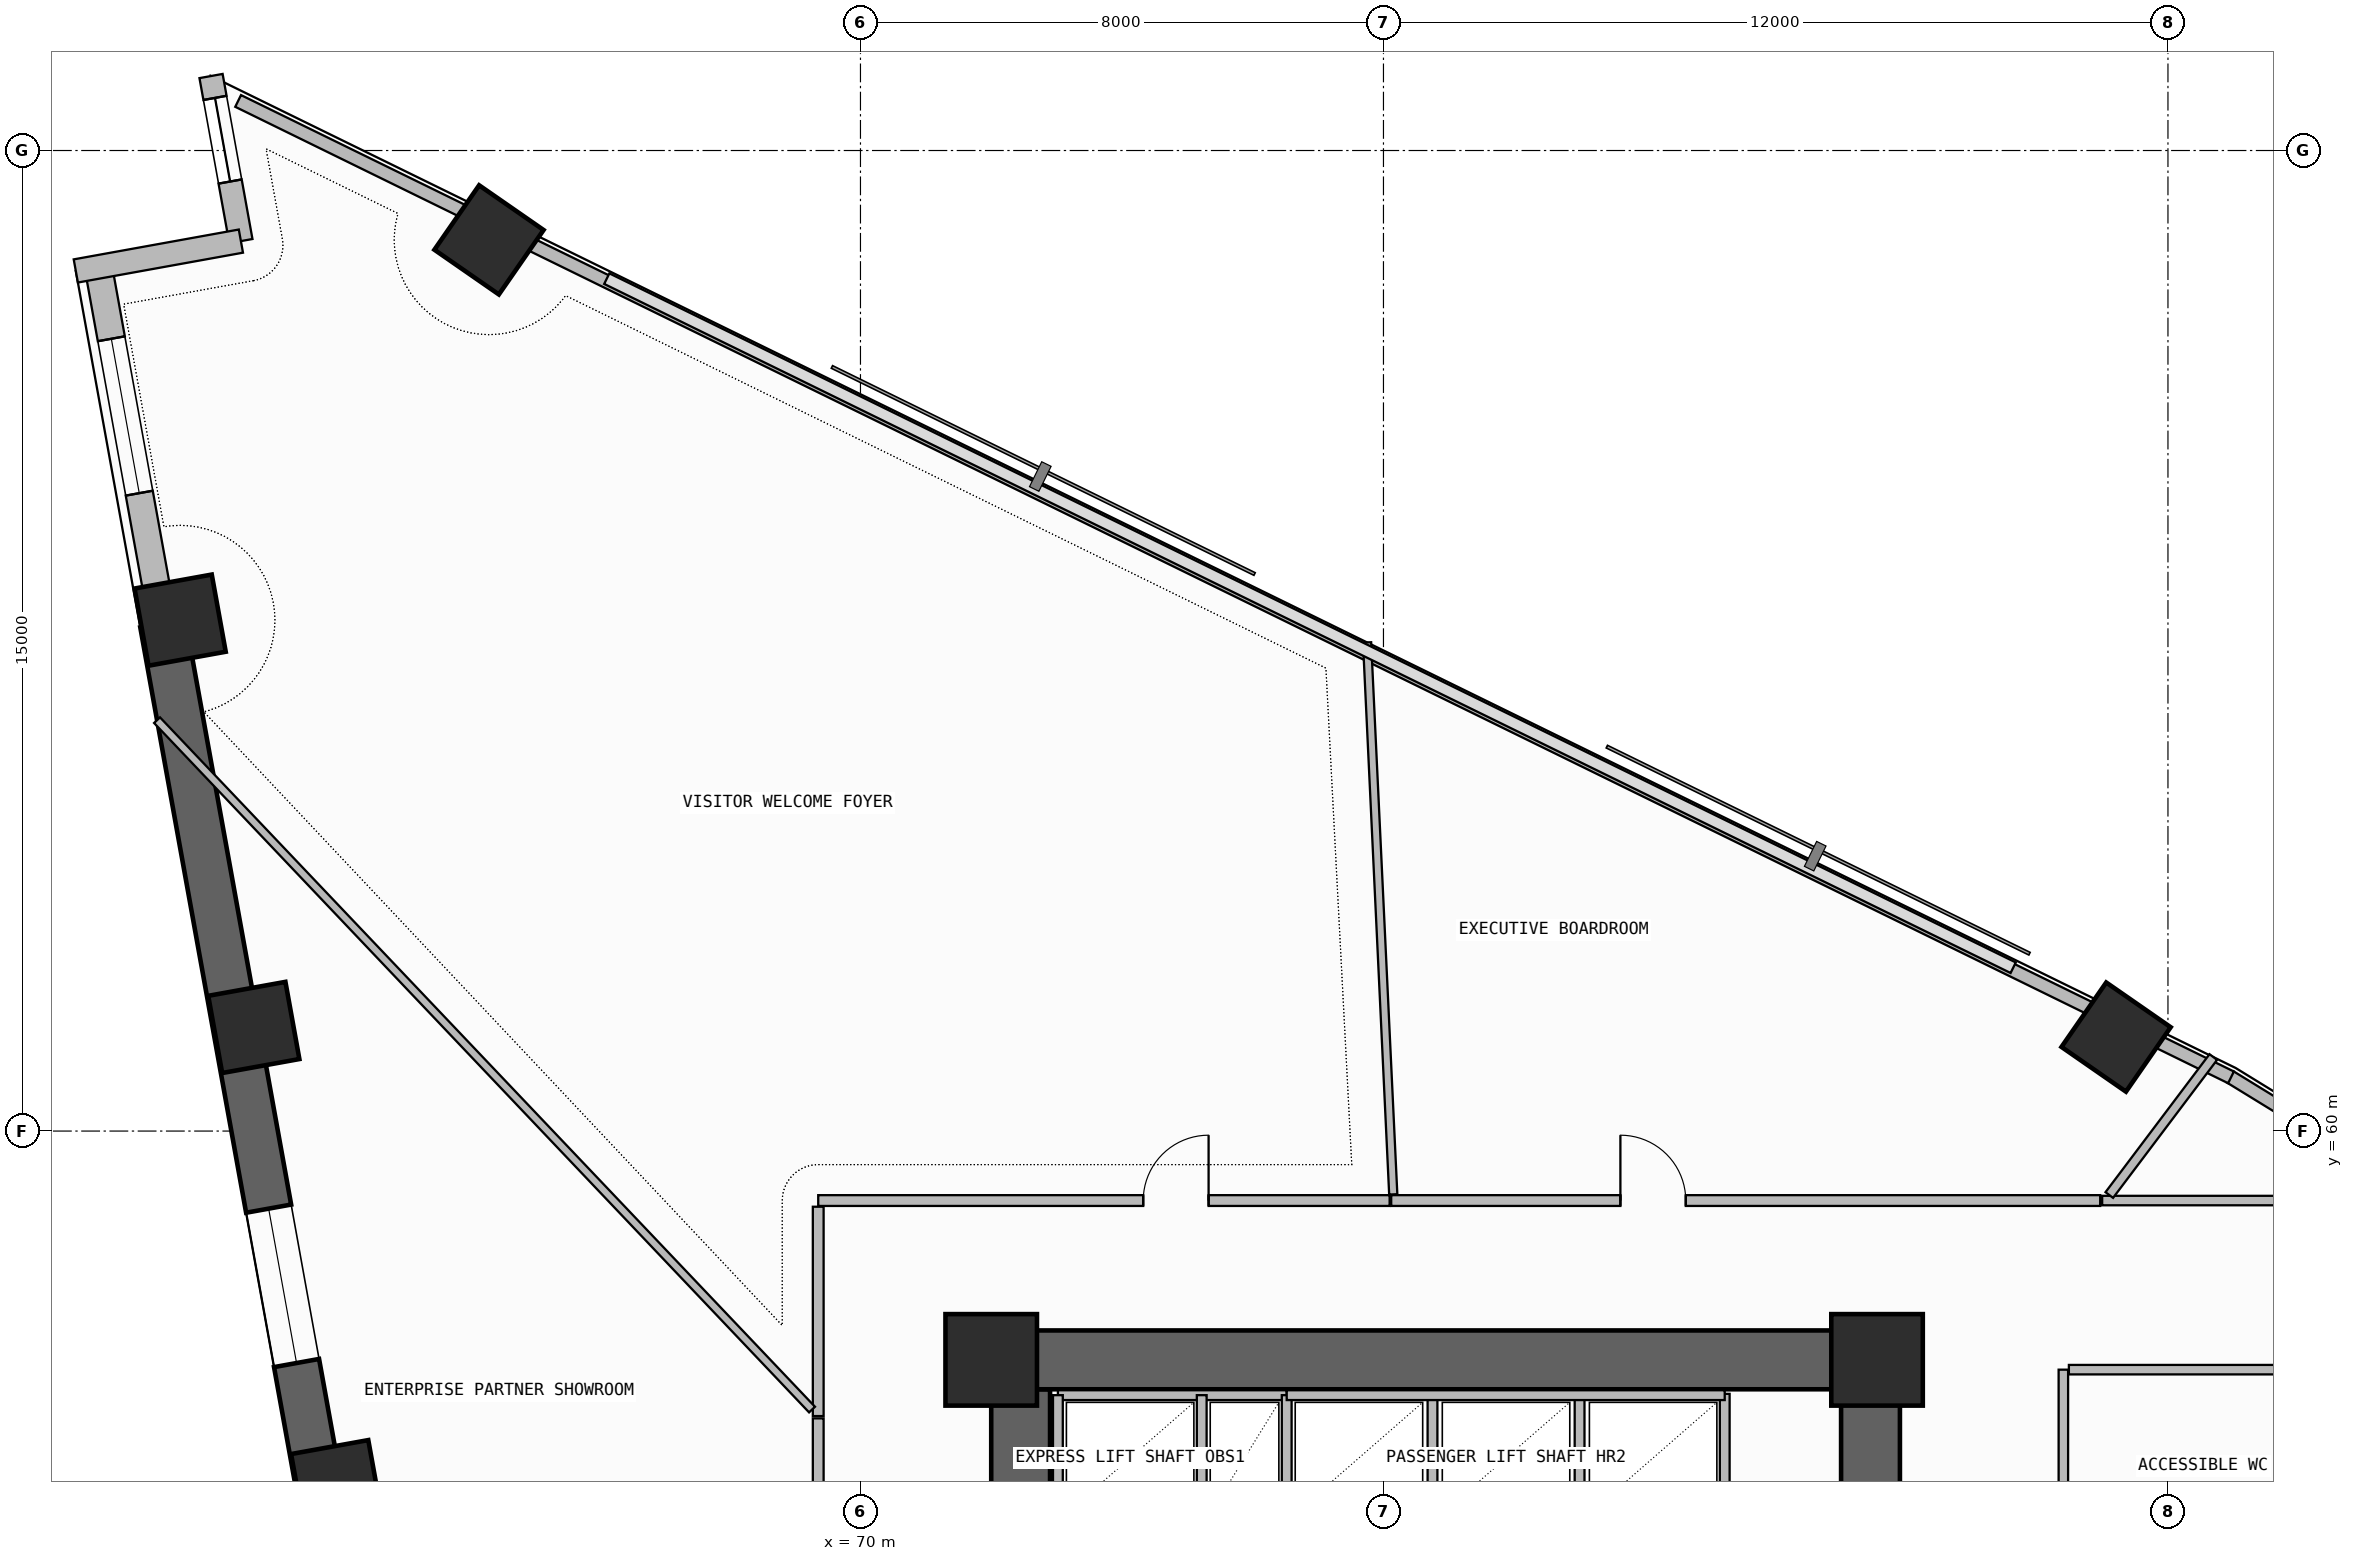
"""IFC4 building model, lengths in metres.
Left out: names, types, materials, properties, quantities, classifications, styles, units other than length and angle.
Written with IfcOpenShell. Run it as: python <this file> out.ifc"""

import sys

from ifc_helpers import new_model, si_unit, direction, frame, frame_2d, origin, origin_2d, place, context, subcontext, project, spatial, rectangle, extrude, element, fill, save


model = new_model("IFC4")
c1 = context("Model", 3, precision=1e-05, world=origin(), true_north=direction((0.0, 1.0)))
c2 = subcontext(c1, "Body", "Model", "MODEL_VIEW")
j1 = project(units=[si_unit("LENGTHUNIT", "METRE"), si_unit("PLANEANGLEUNIT", "RADIAN")], contexts=[c1])
p1 = place(None, origin())
s1 = spatial("IfcSite", under=j1, at=p1, CompositionType="ELEMENT")
p2 = place(p1, origin())
s2 = spatial("IfcBuilding", under=s1, at=p2, CompositionType="ELEMENT")
p3 = place(p2, frame((0.0, 0.0, 106.5)))
s3 = spatial("IfcBuildingStorey", under=s2, at=p3, CompositionType="ELEMENT", Elevation=106.5)
p4 = place(p3, frame((72.45, 43.35, -0.26), z_axis=(0.0, 0.0, 1.0), x_axis=(0.0, 1.0, 0.0)))
e1 = element("IfcWall", 1, at=p4, inside=s3, PredefinedType="SHEAR", context=c2, shape_type="SweptSolid", body=[
    extrude(rectangle(XDim=12.7, YDim=0.9, at=frame_2d((6.35, 0.0))), origin(), (0.0, 0.0, 1.0), 3.6),
])
p5 = place(p4, frame((1.35, 0.0, 0.26)))
e2 = element("IfcOpeningElement", 2, at=p5, cuts=e1, PredefinedType="OPENING", context=c2, shape_type="SweptSolid", body=[
    extrude(rectangle(XDim=1.2, YDim=2.2, at=frame_2d((0.6, 1.1))), frame((0.0, 0.46, 0.0), z_axis=(0.0, -1.0, 0.0), x_axis=(1.0, 0.0, 0.0)), (0.0, 0.0, 1.0), 0.92),
])
p6 = place(p3, frame((72.0, 56.5, -0.26), z_axis=(0.0, 0.0, 1.0), x_axis=(1.0, 0.0, 0.0)))
e3 = element("IfcWall", 3, at=p6, inside=s3, PredefinedType="SHEAR", context=c2, shape_type="SweptSolid", body=[
    extrude(rectangle(XDim=13.9, YDim=0.9, at=frame_2d((6.95, 0.0))), origin(), (0.0, 0.0, 1.0), 3.6),
])
p7 = place(p3, frame((85.45, 47.6, -0.26), z_axis=(0.0, 0.0, 1.0), x_axis=(0.0, 1.0, 0.0)))
e4 = element("IfcWall", 4, at=p7, inside=s3, PredefinedType="SHEAR", context=c2, shape_type="SweptSolid", body=[
    extrude(rectangle(XDim=8.45, YDim=0.9, at=frame_2d((4.225, 0.0))), origin(), (0.0, 0.0, 1.0), 3.6),
])
for number, where, z_axis, x_axis in (
    (5, (72.0, 56.5, 0.0), (0.0, 0.0, 1.0), (1.0, 0.0, 0.0)),
    (6, (85.55, 56.5, 0.0), (0.0, 0.0, 1.0), (1.0, 0.0, 0.0)),
):
    element("IfcColumn", number, at=place(p3, frame(where, z_axis=z_axis, x_axis=x_axis)), inside=s3, PredefinedType="COLUMN", context=c2, shape_type="SweptSolid", body=[
        extrude(rectangle(XDim=1.4, YDim=1.4, at=origin_2d()), origin(), (0.0, 0.0, 1.0), 3.6),
    ])
for number, where, z_axis, x_axis in (
    (7, (89.207, 61.438, 0.0), (0.0, 0.0, 1.0), (0.57, 0.822, 0.0)),
    (8, (64.318, 73.633, 0.0), (0.0, 0.0, 1.0), (0.57, 0.822, 0.0)),
    (9, (59.594, 67.816, 0.0), (0.0, 0.0, 1.0), (-0.178, 0.984, 0.0)),
    (10, (60.72, 61.585, 0.0), (0.0, 0.0, 1.0), (-0.178, 0.984, 0.0)),
    (11, (61.988, 54.575, 0.0), (0.0, 0.0, 1.0), (-0.178, 0.984, 0.0)),
):
    element("IfcColumn", number, at=place(p3, frame(where, z_axis=z_axis, x_axis=x_axis)), inside=s3, PredefinedType="COLUMN", context=c2, shape_type="SweptSolid", body=[
        extrude(rectangle(XDim=1.2, YDim=1.2, at=origin_2d()), origin(), (0.0, 0.0, 1.0), 3.6),
    ])
p8 = place(p3, frame((58.342, 73.22, 0.0), z_axis=(0.0, 0.0, 1.0), x_axis=(0.177981837245, -0.984033772597, 0.0)))
e12 = element("IfcWall", 12, at=p8, inside=s3, PredefinedType="SOLIDWALL", context=c2, shape_type="SweptSolid", body=[
    extrude(rectangle(XDim=5.54, YDim=0.42, at=frame_2d((2.77, 0.0))), origin(), (0.0, 0.0, 1.0), 2.725),
])
p9 = place(p8, frame((1.118, 0.0, 1.2)))
e13 = element("IfcOpeningElement", 13, at=p9, cuts=e12, PredefinedType="OPENING", context=c2, shape_type="SweptSolid", body=[
    extrude(rectangle(XDim=2.4, YDim=0.9, at=frame_2d((1.2, 0.45))), frame((0.0, 0.22, 0.0), z_axis=(0.0, -1.0, 0.0), x_axis=(1.0, 0.0, 0.0)), (0.0, 0.0, 1.0), 0.44),
])
p10 = place(p3, frame((59.328, 67.768, -0.26), z_axis=(0.0, 0.0, 1.0), x_axis=(0.177933213615, -0.984042565895, 0.0)))
e14 = element("IfcWall", 14, at=p10, inside=s3, PredefinedType="SHEAR", context=c2, shape_type="SweptSolid", body=[
    extrude(rectangle(XDim=20.579, YDim=0.7, at=frame_2d((10.289, 0.0))), origin(), (0.0, 0.0, 1.0), 3.6),
])
p11 = place(p10, frame((9.1, 0.0, 1.2)))
e15 = element("IfcOpeningElement", 15, at=p11, cuts=e14, PredefinedType="OPENING", context=c2, shape_type="SweptSolid", body=[
    extrude(rectangle(XDim=2.4, YDim=0.9, at=frame_2d((1.2, 0.45))), frame((0.0, 0.36, 0.0), z_axis=(0.0, -1.0, 0.0), x_axis=(1.0, 0.0, 0.0)), (0.0, 0.0, 1.0), 0.72),
])
p12 = place(p3, frame((60.066, 76.139, 0.0), z_axis=(0.0, 0.0, 1.0), x_axis=(0.177897493713, -0.984049024048, 0.0)))
e16 = element("IfcWall", 16, at=p12, inside=s3, PredefinedType="SOLIDWALL", context=c2, shape_type="SweptSolid", body=[
    extrude(rectangle(XDim=2.566, YDim=0.36, at=frame_2d((1.283, 0.0))), origin(), (0.0, 0.0, 1.0), 3.34),
])
p13 = place(p12, frame((0.34, 0.0, 0.45)))
e17 = element("IfcOpeningElement", 17, at=p13, cuts=e16, PredefinedType="OPENING", context=c2, shape_type="SweptSolid", body=[
    extrude(rectangle(XDim=1.3, YDim=2.4, at=frame_2d((0.65, 1.2))), frame((0.0, 0.19, 0.0), z_axis=(0.0, -1.0, 0.0), x_axis=(1.0, 0.0, 0.0)), (0.0, 0.0, 1.0), 0.38),
])
p14 = place(p3, frame((60.523, 73.614, 0.0), z_axis=(0.0, 0.0, 1.0), x_axis=(-0.984046012923, -0.177914149102, 0.0)))
e18 = element("IfcWall", 18, at=p14, inside=s3, PredefinedType="SOLIDWALL", context=c2, shape_type="SweptSolid", body=[
    extrude(rectangle(XDim=2.566, YDim=0.36, at=frame_2d((1.283, 0.0))), origin(), (0.0, 0.0, 1.0), 3.34),
])
p15 = place(p3, frame((119.865, 43.07, 0.0), z_axis=(0.0, 0.0, 1.0), x_axis=(-0.852110824326, 0.52336138859, 0.0)))
e19 = element("IfcWall", 19, at=p15, inside=s3, PredefinedType="PARAPET", context=c2, shape_type="SweptSolid", body=[
    extrude(rectangle(XDim=33.932, YDim=0.2, at=frame_2d((16.966, 0.0))), origin(), (0.0, 0.0, 1.0), 1.15),
])
p16 = place(p3, frame((90.964, 60.822, 0.0), z_axis=(0.0, 0.0, 1.0), x_axis=(-0.898000468284, 0.439994498787, 0.0)))
e20 = element("IfcWall", 20, at=p16, inside=s3, PredefinedType="PARAPET", context=c2, shape_type="SweptSolid", body=[
    extrude(rectangle(XDim=1.423, YDim=0.2, at=frame_2d((0.712, 0.0))), origin(), (0.0, 0.0, 1.0), 1.15),
])
p17 = place(p3, frame((88.921, 61.823, 0.0), z_axis=(0.0, 0.0, 1.0), x_axis=(-0.897993533426, 0.440008652103, 0.0)))
e21 = element("IfcWall", 21, at=p17, inside=s3, PredefinedType="PARAPET", context=c2, shape_type="SweptSolid", body=[
    extrude(rectangle(XDim=26.864, YDim=0.2, at=frame_2d((13.432, 0.0))), origin(), (0.0, 0.0, 1.0), 1.15),
])
p18 = place(p3, frame((64.032, 74.018, 0.0), z_axis=(0.0, 0.0, 1.0), x_axis=(-0.89799103332, 0.440013754417, 0.0)))
e22 = element("IfcWall", 22, at=p18, inside=s3, PredefinedType="PARAPET", context=c2, shape_type="SweptSolid", body=[
    extrude(rectangle(XDim=3.955, YDim=0.2, at=frame_2d((1.978, 0.0))), origin(), (0.0, 0.0, 1.0), 1.15),
])
p19 = place(p3, frame((73.02, 55.96, 0.0), z_axis=(0.0, 0.0, 1.0), x_axis=(1.0, 0.0, 0.0)))
e23 = element("IfcWall", 23, at=p19, inside=s3, PredefinedType="SOLIDWALL", context=c2, shape_type="SweptSolid", body=[
    extrude(rectangle(XDim=3.5, YDim=0.15, at=frame_2d((1.75, 0.0))), origin(), (0.0, 0.0, 1.0), 3.34),
])
p20 = place(p3, frame((73.02, 54.02, 0.0), z_axis=(0.0, 0.0, 1.0), x_axis=(0.0, 1.0, 0.0)))
e24 = element("IfcWall", 24, at=p20, inside=s3, PredefinedType="PLUMBINGWALL", context=c2, shape_type="SweptSolid", body=[
    extrude(rectangle(XDim=1.94, YDim=0.15, at=frame_2d((0.97, 0.0))), origin(), (0.0, 0.0, 1.0), 3.34),
])
p21 = place(p3, frame((76.52, 54.02, 0.0), z_axis=(0.0, 0.0, 1.0), x_axis=(0.0, 1.0, 0.0)))
e25 = element("IfcWall", 25, at=p21, inside=s3, PredefinedType="SOLIDWALL", context=c2, shape_type="SweptSolid", body=[
    extrude(rectangle(XDim=1.94, YDim=0.15, at=frame_2d((0.97, 0.0))), origin(), (0.0, 0.0, 1.0), 3.34),
])
p22 = place(p3, frame((75.22, 54.02, 0.0), z_axis=(0.0, 0.0, 1.0), x_axis=(0.0, 1.0, 0.0)))
e26 = element("IfcWall", 26, at=p22, inside=s3, PredefinedType="PLUMBINGWALL", context=c2, shape_type="SweptSolid", body=[
    extrude(rectangle(XDim=1.94, YDim=0.15, at=frame_2d((0.97, 0.0))), origin(), (0.0, 0.0, 1.0), 3.34),
])
for number, where, z_axis, x_axis in (
    (27, (78.75, 54.02, 0.0), (0.0, 0.0, 1.0), (0.0, 1.0, 0.0)),
    (28, (81.0, 54.02, 0.0), (0.0, 0.0, 1.0), (0.0, 1.0, 0.0)),
):
    element("IfcWall", number, at=place(p3, frame(where, z_axis=z_axis, x_axis=x_axis)), inside=s3, PredefinedType="PLUMBINGWALL", context=c2, shape_type="SweptSolid", body=[
        extrude(rectangle(XDim=1.96, YDim=0.15, at=frame_2d((0.98, 0.0))), origin(), (0.0, 0.0, 1.0), 3.34),
    ])
p23 = place(p3, frame((83.22, 54.02, 0.0), z_axis=(0.0, 0.0, 1.0), x_axis=(0.0, 1.0, 0.0)))
e29 = element("IfcWall", 29, at=p23, inside=s3, PredefinedType="SOLIDWALL", context=c2, shape_type="SweptSolid", body=[
    extrude(rectangle(XDim=1.96, YDim=0.15, at=frame_2d((0.98, 0.0))), origin(), (0.0, 0.0, 1.0), 3.34),
])
p24 = place(p3, frame((76.52, 55.96, 0.0), z_axis=(0.0, 0.0, 1.0), x_axis=(1.0, 0.0, 0.0)))
e30 = element("IfcWall", 30, at=p24, inside=s3, PredefinedType="SOLIDWALL", context=c2, shape_type="SweptSolid", body=[
    extrude(rectangle(XDim=6.7, YDim=0.15, at=frame_2d((3.35, 0.0))), origin(), (0.0, 0.0, 1.0), 3.34),
])
p25 = place(p3, frame((93.382, 58.937, 0.0), z_axis=(0.0, 0.0, 1.0), x_axis=(-1.0, 0.0, 0.0)))
e31 = element("IfcWall", 31, at=p25, inside=s3, PredefinedType="PARTITIONING", context=c2, shape_type="SweptSolid", body=[
    extrude(rectangle(XDim=4.388, YDim=0.145, at=frame_2d((2.194, 0.0))), origin(), (0.0, 0.0, 1.0), 2.725),
])
p26 = place(p3, frame((89.103, 59.021, 0.0), z_axis=(0.0, 0.0, 1.0), x_axis=(0.601816091095, 0.798634705294, 0.0)))
e32 = element("IfcWall", 32, at=p26, inside=s3, PredefinedType="PARTITIONING", context=c2, shape_type="SweptSolid", body=[
    extrude(rectangle(XDim=2.643, YDim=0.145, at=frame_2d((1.322, 0.0))), origin(), (0.0, 0.0, 1.0), 2.725),
])
p27 = place(p3, frame((88.4, 49.092, 0.0), z_axis=(0.0, 0.0, 1.0), x_axis=(0.0, 1.0, 0.0)))
e33 = element("IfcWall", 33, at=p27, inside=s3, PredefinedType="PARTITIONING", context=c2, shape_type="SweptSolid", body=[
    extrude(rectangle(XDim=7.258, YDim=0.145, at=frame_2d((3.629, 0.0))), origin(), (0.0, 0.0, 1.0), 2.725),
])
p28 = place(p27, frame((3.154, 0.0, 0.0)))
e34 = element("IfcOpeningElement", 34, at=p28, cuts=e33, PredefinedType="OPENING", context=c2, shape_type="SweptSolid", body=[
    extrude(rectangle(XDim=0.95, YDim=2.15, at=frame_2d((0.475, 1.075))), frame((0.0, 0.083, 0.0), z_axis=(0.0, -1.0, 0.0), x_axis=(1.0, 0.0, 0.0)), (0.0, 0.0, 1.0), 0.165),
])
p29 = place(p3, frame((88.485, 56.35, 0.0), z_axis=(0.0, 0.0, 1.0), x_axis=(1.0, 0.0, 0.0)))
e35 = element("IfcWall", 35, at=p29, inside=s3, PredefinedType="PARTITIONING", context=c2, shape_type="SweptSolid", body=[
    extrude(rectangle(XDim=3.427, YDim=0.145, at=frame_2d((1.714, 0.0))), origin(), (0.0, 0.0, 1.0), 2.875),
])
p30 = place(p3, frame((88.963, 58.937, 0.0), z_axis=(0.0, 0.0, 1.0), x_axis=(-1.0, 0.0, 0.0)))
e36 = element("IfcWall", 36, at=p30, inside=s3, PredefinedType="PARTITIONING", context=c2, shape_type="SweptSolid", body=[
    extrude(rectangle(XDim=10.845, YDim=0.165, at=frame_2d((5.422, 0.0))), origin(), (0.0, 0.0, 1.0), 2.725),
])
p31 = place(p30, frame((6.339, 0.0, 0.0)))
e37 = element("IfcOpeningElement", 37, at=p31, cuts=e36, PredefinedType="OPENING", context=c2, shape_type="SweptSolid", body=[
    extrude(rectangle(XDim=1.0, YDim=2.2, at=frame_2d((0.5, 1.1))), frame((0.0, 0.093, 0.0), z_axis=(0.0, -1.0, 0.0), x_axis=(1.0, 0.0, 0.0)), (0.0, 0.0, 1.0), 0.185),
])
p32 = place(p3, frame((78.15, 59.031, 0.0), z_axis=(0.0, 0.0, 1.0), x_axis=(-0.047396361904, 0.998876160932, 0.0)))
e38 = element("IfcWall", 38, at=p32, inside=s3, PredefinedType="PARTITIONING", context=c2, shape_type="SweptSolid", body=[
    extrude(rectangle(XDim=8.453, YDim=0.125, at=frame_2d((4.227, 0.0))), origin(), (0.0, 0.0, 1.0), 3.34),
])
p33 = place(p3, frame((78.094, 58.937, 0.0), z_axis=(0.0, 0.0, 1.0), x_axis=(-1.0, 0.0, 0.0)))
e39 = element("IfcWall", 39, at=p33, inside=s3, PredefinedType="PARTITIONING", context=c2, shape_type="SweptSolid", body=[
    extrude(rectangle(XDim=8.74, YDim=0.165, at=frame_2d((4.37, 0.0))), origin(), (0.0, 0.0, 1.0), 2.725),
])
p34 = place(p33, frame((2.769, 0.0, 0.0)))
e40 = element("IfcOpeningElement", 40, at=p34, cuts=e39, PredefinedType="OPENING", context=c2, shape_type="SweptSolid", body=[
    extrude(rectangle(XDim=1.0, YDim=2.2, at=frame_2d((0.5, 1.1))), frame((0.0, 0.093, 0.0), z_axis=(0.0, -1.0, 0.0), x_axis=(1.0, 0.0, 0.0)), (0.0, 0.0, 1.0), 0.185),
])
p35 = place(p3, frame((69.354, 58.843, 0.0), z_axis=(0.0, 0.0, 1.0), x_axis=(0.0, -1.0, 0.0)))
e41 = element("IfcWall", 41, at=p35, inside=s3, PredefinedType="PARTITIONING", context=c2, shape_type="SweptSolid", body=[
    extrude(rectangle(XDim=3.203, YDim=0.165, at=frame_2d((1.601, 0.0))), origin(), (0.0, 0.0, 1.0), 2.725),
])
p36 = place(p3, frame((69.259, 55.74, 0.0), z_axis=(0.0, 0.0, 1.0), x_axis=(-0.688765781804, 0.72498392935, 0.0)))
e42 = element("IfcWall", 42, at=p36, inside=s3, PredefinedType="PARTITIONING", context=c2, shape_type="SweptSolid", body=[
    extrude(rectangle(XDim=14.547, YDim=0.125, at=frame_2d((7.273, 0.0))), origin(), (0.0, 0.0, 1.0), 2.725),
])
p37 = place(p3, frame((69.354, 55.605, 0.0), z_axis=(0.0, 0.0, 1.0), x_axis=(0.0, -1.0, 0.0)))
e43 = element("IfcWall", 43, at=p37, inside=s3, PredefinedType="PARTITIONING", context=c2, shape_type="SweptSolid", body=[
    extrude(rectangle(XDim=5.513, YDim=0.165, at=frame_2d((2.756, 0.0))), origin(), (0.0, 0.0, 1.0), 2.725),
])
p38 = place(p37, frame((1.639, 0.0, 0.0)))
e44 = element("IfcOpeningElement", 44, at=p38, cuts=e43, PredefinedType="OPENING", context=c2, shape_type="SweptSolid", body=[
    extrude(rectangle(XDim=1.0, YDim=2.2, at=frame_2d((0.5, 1.1))), frame((0.0, 0.093, 0.0), z_axis=(0.0, -1.0, 0.0), x_axis=(1.0, 0.0, 0.0)), (0.0, 0.0, 1.0), 0.185),
])
p39 = place(p9, origin())
e45 = element("IfcWindow", 45, at=p39, inside=s3, PartitioningType="SINGLE_PANEL", PredefinedType="WINDOW", context=c2, shape_type="SweptSolid", body=[
    extrude(rectangle(XDim=2.4, YDim=0.9, at=frame_2d((1.2, 0.45))), frame((0.0, 0.03, 0.0), z_axis=(0.0, -1.0, 0.0), x_axis=(1.0, 0.0, 0.0)), (0.0, 0.0, 1.0), 0.06),
])
fill(e13, e45)
p40 = place(p11, origin())
e46 = element("IfcWindow", 46, at=p40, inside=s3, PartitioningType="SINGLE_PANEL", PredefinedType="WINDOW", context=c2, shape_type="SweptSolid", body=[
    extrude(rectangle(XDim=2.4, YDim=0.9, at=frame_2d((1.2, 0.45))), frame((0.0, 0.03, 0.0), z_axis=(0.0, -1.0, 0.0), x_axis=(1.0, 0.0, 0.0)), (0.0, 0.0, 1.0), 0.06),
])
fill(e15, e46)
p41 = place(p13, origin())
e47 = element("IfcWindow", 47, at=p41, inside=s3, PartitioningType="SINGLE_PANEL", PredefinedType="WINDOW", context=c2, shape_type="SweptSolid", body=[
    extrude(rectangle(XDim=1.3, YDim=2.4, at=frame_2d((0.65, 1.2))), frame((0.0, 0.03, 0.0), z_axis=(0.0, -1.0, 0.0), x_axis=(1.0, 0.0, 0.0)), (0.0, 0.0, 1.0), 0.06),
])
fill(e17, e47)
p42 = place(p31, frame((1.0, 0.0, 0.0), z_axis=(0.0, 0.0, 1.0), x_axis=(-1.0, 0.0, 0.0)))
e48 = element("IfcDoor", 48, at=p42, inside=s3, OperationType="SINGLE_SWING_LEFT", PredefinedType="DOOR", context=c2, shape_type="SweptSolid", body=[
    extrude(rectangle(XDim=1.0, YDim=2.2, at=frame_2d((0.5, 1.1))), frame((0.0, 0.025, 0.0), z_axis=(0.0, -1.0, 0.0), x_axis=(1.0, 0.0, 0.0)), (0.0, 0.0, 1.0), 0.05),
])
fill(e37, e48)
p43 = place(p34, frame((1.0, 0.0, 0.0), z_axis=(0.0, 0.0, 1.0), x_axis=(-1.0, 0.0, 0.0)))
e49 = element("IfcDoor", 49, at=p43, inside=s3, OperationType="SINGLE_SWING_RIGHT", PredefinedType="DOOR", context=c2, shape_type="SweptSolid", body=[
    extrude(rectangle(XDim=1.0, YDim=2.2, at=frame_2d((0.5, 1.1))), frame((0.0, 0.025, 0.0), z_axis=(0.0, -1.0, 0.0), x_axis=(1.0, 0.0, 0.0)), (0.0, 0.0, 1.0), 0.05),
])
fill(e40, e49)
save(model, sys.argv[1])
